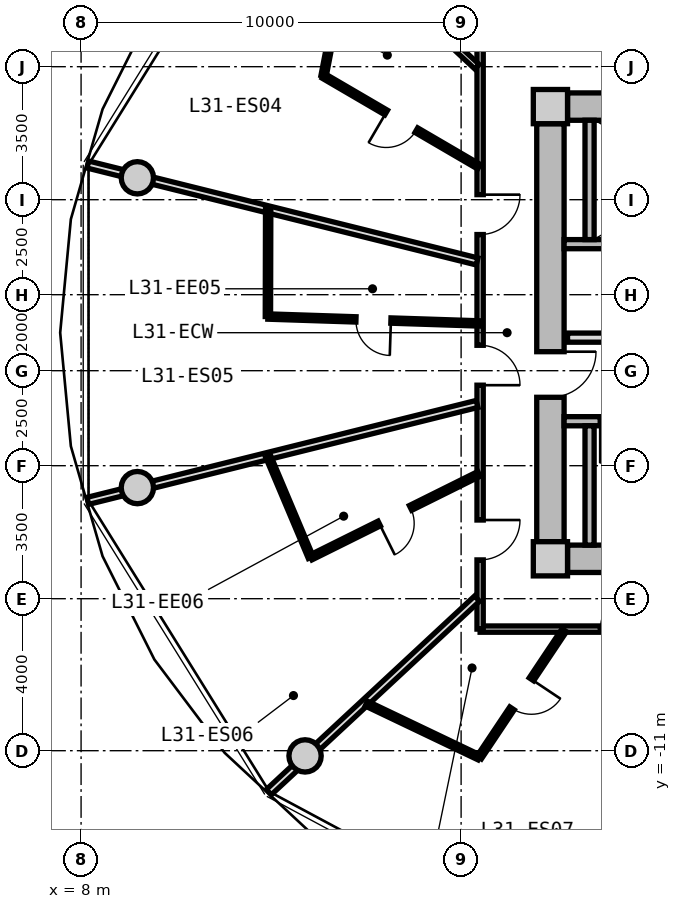
"""IFC4 building model, lengths in metres.
Left out: names, types, materials, properties, quantities, classifications, styles, units other than length and angle.
Written with IfcOpenShell. Run it as: python <this file> out.ifc"""

import sys

from ifc_helpers import new_model, si_unit, direction, frame, frame_2d, origin, origin_2d, place, context, subcontext, project, spatial, rectangle, circle, extrude, source, transform, mapped, element, fill, save


model = new_model("IFC4")
c1 = context("Model", 3, precision=1e-05, world=origin(), true_north=direction((0.0, 1.0)))
c2 = subcontext(c1, "Body", "Model", "MODEL_VIEW")
j1 = project(units=[si_unit("LENGTHUNIT", "METRE"), si_unit("PLANEANGLEUNIT", "RADIAN")], contexts=[c1])
p1 = place(None, origin())
s1 = spatial("IfcSite", under=j1, at=p1, CompositionType="ELEMENT")
p2 = place(p1, origin())
s2 = spatial("IfcBuilding", under=s1, at=p2, CompositionType="ELEMENT")
p3 = place(p2, frame((0.0, 0.0, 102.35)))
s3 = spatial("IfcBuildingStorey", under=s2, at=p3, CompositionType="ELEMENT", Elevation=102.35)
m1 = source(origin(), c2, "Body", "SweptSolid", [
    extrude(rectangle(XDim=0.9, YDim=0.9, at=origin_2d()), origin(), (0.0, 0.0, 1.0), 3.05),
])
for number, where, z_axis, x_axis in (
    (1, (20.35, -5.95, 0.0), (0.0, 0.0, 1.0), (1.0, 0.0, 0.0)),
    (2, (20.35, 5.95, 0.0), (0.0, 0.0, 1.0), (1.0, 0.0, 0.0)),
):
    element("IfcColumn", number, at=place(p3, frame(where, z_axis=z_axis, x_axis=x_axis)), inside=s3, PredefinedType="COLUMN", context=c2, shape_type="MappedRepresentation", body=[
        mapped(m1, transform((0.0, 0.0, 0.0), x_axis=(1.0, 0.0, 0.0), y_axis=(0.0, 1.0, 0.0), z_axis=(0.0, 0.0, 1.0), scale=1.0)),
    ])
m2 = source(origin(), c2, "Body", "SweptSolid", [
    extrude(rectangle(XDim=14.4, YDim=0.72, at=frame_2d((7.2, 0.0))), origin(), (0.0, 0.0, 1.0), 2.79),
])
for number, where, z_axis, x_axis in (
    (3, (20.8, 5.95, 0.0), (0.0, 0.0, 1.0), (1.0, 0.0, 0.0)),
    (4, (35.2, -5.95, 0.0), (0.0, 0.0, 1.0), (-1.0, 0.0, 0.0)),
):
    element("IfcWall", number, at=place(p3, frame(where, z_axis=z_axis, x_axis=x_axis)), inside=s3, PredefinedType="SHEAR", context=c2, shape_type="MappedRepresentation", body=[
        mapped(m2, transform((0.0, 0.0, 0.0), x_axis=(1.0, 0.0, 0.0), y_axis=(0.0, 1.0, 0.0), z_axis=(0.0, 0.0, 1.0), scale=1.0)),
    ])
m3 = source(origin(), c2, "Body", "SweptSolid", [
    extrude(rectangle(XDim=11.0, YDim=0.72, at=frame_2d((5.5, 0.0))), origin(), (0.0, 0.0, 1.0), 2.79),
])
p4 = place(p3, frame((20.35, -5.5, 0.0), z_axis=(0.0, 0.0, 1.0), x_axis=(0.0, 1.0, 0.0)))
e5 = element("IfcWall", 5, at=p4, inside=s3, PredefinedType="SHEAR", context=c2, shape_type="MappedRepresentation", body=[
    mapped(m3, transform((0.0, 0.0, 0.0), x_axis=(1.0, 0.0, 0.0), y_axis=(0.0, 1.0, 0.0), z_axis=(0.0, 0.0, 1.0), scale=1.0)),
])
p5 = place(p4, frame((3.8, 0.0, 0.0)))
e6 = element("IfcOpeningElement", 6, at=p5, cuts=e5, PredefinedType="OPENING", context=c2, shape_type="SweptSolid", body=[
    extrude(rectangle(XDim=1.2, YDim=2.15, at=frame_2d((0.6, 1.075))), frame((0.0, 0.37, 0.0), z_axis=(0.0, -1.0, 0.0), x_axis=(1.0, 0.0, 0.0)), (0.0, 0.0, 1.0), 0.74),
])
m4 = source(origin(), c2, "Body", "SweptSolid", [
    extrude(circle(Radius=0.425, at=origin_2d()), origin(), (0.0, 0.0, 1.0), 3.05),
])
for number, where, z_axis, x_axis in (
    (7, (9.481, 4.076, 0.0), (0.0, 0.0, 1.0), (1.0, 0.0, 0.0)),
    (8, (9.481, -4.076, 0.0), (0.0, 0.0, 1.0), (1.0, 0.0, 0.0)),
    (9, (13.894, -11.137, 0.0), (0.0, 0.0, 1.0), (1.0, 0.0, 0.0)),
):
    element("IfcColumn", number, at=place(p3, frame(where, z_axis=z_axis, x_axis=x_axis)), inside=s3, PredefinedType="COLUMN", context=c2, shape_type="MappedRepresentation", body=[
        mapped(m4, transform((0.0, 0.0, 0.0), x_axis=(1.0, 0.0, 0.0), y_axis=(0.0, 1.0, 0.0), z_axis=(0.0, 0.0, 1.0), scale=1.0)),
    ])
m5 = source(origin(), c2, "Body", "SweptSolid", [
    extrude(rectangle(XDim=7.83, YDim=0.24, at=frame_2d((3.915, 0.0))), origin(), (0.0, 0.0, 1.0), 2.79),
])
p6 = place(p3, frame((20.71, 2.33, 0.0), z_axis=(0.0, 0.0, 1.0), x_axis=(1.0, 0.0, 0.0)))
e10 = element("IfcWall", 10, at=p6, inside=s3, PredefinedType="PARTITIONING", context=c2, shape_type="MappedRepresentation", body=[
    mapped(m5, transform((0.0, 0.0, 0.0), x_axis=(1.0, 0.0, 0.0), y_axis=(0.0, 1.0, 0.0), z_axis=(0.0, 0.0, 1.0), scale=1.0)),
])
m6 = source(origin(), c2, "Body", "SweptSolid", [
    extrude(rectangle(XDim=3.14, YDim=0.24, at=frame_2d((1.57, 0.0))), origin(), (0.0, 0.0, 1.0), 2.79),
])
p7 = place(p3, frame((21.38, 2.45, 0.0), z_axis=(0.0, 0.0, 1.0), x_axis=(0.0, 1.0, 0.0)))
e11 = element("IfcWall", 11, at=p7, inside=s3, PredefinedType="PARTITIONING", context=c2, shape_type="MappedRepresentation", body=[
    mapped(m6, transform((0.0, 0.0, 0.0), x_axis=(1.0, 0.0, 0.0), y_axis=(0.0, 1.0, 0.0), z_axis=(0.0, 0.0, 1.0), scale=1.0)),
])
p8 = place(p3, frame((20.71, -2.33, 0.0), z_axis=(0.0, 0.0, 1.0), x_axis=(1.0, 0.0, 0.0)))
e12 = element("IfcWall", 12, at=p8, inside=s3, PredefinedType="PARTITIONING", context=c2, shape_type="MappedRepresentation", body=[
    mapped(m5, transform((0.0, 0.0, 0.0), x_axis=(1.0, 0.0, 0.0), y_axis=(0.0, 1.0, 0.0), z_axis=(0.0, 0.0, 1.0), scale=1.0)),
])
p9 = place(p8, frame((0.95, 0.0, 0.0)))
e13 = element("IfcOpeningElement", 13, at=p9, cuts=e12, PredefinedType="OPENING", context=c2, shape_type="SweptSolid", body=[
    extrude(rectangle(XDim=1.1, YDim=2.15, at=frame_2d((0.55, 1.075))), frame((0.0, 0.13, 0.0), z_axis=(0.0, -1.0, 0.0), x_axis=(1.0, 0.0, 0.0)), (0.0, 0.0, 1.0), 0.26),
])
p10 = place(p3, frame((21.38, -5.59, 0.0), z_axis=(0.0, 0.0, 1.0), x_axis=(0.0, 1.0, 0.0)))
e14 = element("IfcWall", 14, at=p10, inside=s3, PredefinedType="PARTITIONING", context=c2, shape_type="MappedRepresentation", body=[
    mapped(m6, transform((0.0, 0.0, 0.0), x_axis=(1.0, 0.0, 0.0), y_axis=(0.0, 1.0, 0.0), z_axis=(0.0, 0.0, 1.0), scale=1.0)),
])
m7 = source(origin(), c2, "Body", "SweptSolid", [
    extrude(rectangle(XDim=7.62, YDim=0.24, at=frame_2d((3.81, 0.0))), origin(), (0.0, 0.0, 1.0), 2.775),
])
p11 = place(p3, frame((20.8, -0.13, 0.0), z_axis=(0.0, 0.0, 1.0), x_axis=(1.0, 0.0, 0.0)))
e15 = element("IfcWall", 15, at=p11, inside=s3, PredefinedType="PARTITIONING", context=c2, shape_type="MappedRepresentation", body=[
    mapped(m7, transform((0.0, 0.0, 0.0), x_axis=(1.0, 0.0, 0.0), y_axis=(0.0, 1.0, 0.0), z_axis=(0.0, 0.0, 1.0), scale=1.0)),
])
p12 = place(p11, frame((6.22, 0.0, 0.0)))
e16 = element("IfcOpeningElement", 16, at=p12, cuts=e15, PredefinedType="OPENING", context=c2, shape_type="SweptSolid", body=[
    extrude(rectangle(XDim=1.0, YDim=2.1, at=frame_2d((0.5, 1.05))), frame((0.0, 0.13, 0.0), z_axis=(0.0, -1.0, 0.0), x_axis=(1.0, 0.0, 0.0)), (0.0, 0.0, 1.0), 0.26),
])
p13 = place(p11, frame((2.4, 0.0, 0.0)))
e17 = element("IfcOpeningElement", 17, at=p13, cuts=e15, PredefinedType="OPENING", context=c2, shape_type="SweptSolid", body=[
    extrude(rectangle(XDim=1.0, YDim=2.1, at=frame_2d((0.5, 1.05))), frame((0.0, 0.13, 0.0), z_axis=(0.0, -1.0, 0.0), x_axis=(1.0, 0.0, 0.0)), (0.0, 0.0, 1.0), 0.26),
])
m8 = source(origin(), c2, "Body", "SweptSolid", [
    extrude(rectangle(XDim=8.6, YDim=0.165, at=frame_2d((4.3, 0.0))), origin(), (0.0, 0.0, 1.0), 2.775),
])
p14 = place(p3, frame((27.1, -7.8, 0.0), z_axis=(0.0, 0.0, 1.0), x_axis=(-1.0, 0.0, 0.0)))
e18 = element("IfcWall", 18, at=p14, inside=s3, PredefinedType="PARTITIONING", context=c2, shape_type="MappedRepresentation", body=[
    mapped(m8, transform((0.0, 0.0, 0.0), x_axis=(1.0, 0.0, 0.0), y_axis=(0.0, 1.0, 0.0), z_axis=(0.0, 0.0, 1.0), scale=1.0)),
])
p15 = place(p14, frame((4.384, 0.0, 0.0)))
e19 = element("IfcOpeningElement", 19, at=p15, cuts=e18, PredefinedType="OPENING", context=c2, shape_type="SweptSolid", body=[
    extrude(rectangle(XDim=1.05, YDim=2.15, at=frame_2d((0.525, 1.075))), frame((0.0, 0.093, 0.0), z_axis=(0.0, -1.0, 0.0), x_axis=(1.0, 0.0, 0.0)), (0.0, 0.0, 1.0), 0.185),
])
m9 = source(origin(), c2, "Body", "SweptSolid", [
    extrude(rectangle(XDim=15.6, YDim=0.165, at=frame_2d((7.8, 0.0))), origin(), (0.0, 0.0, 1.0), 2.775),
])
p16 = place(p3, frame((18.5, -7.8, 0.0), z_axis=(0.0, 0.0, 1.0), x_axis=(0.0, 1.0, 0.0)))
e20 = element("IfcWall", 20, at=p16, inside=s3, PredefinedType="PARTITIONING", context=c2, shape_type="MappedRepresentation", body=[
    mapped(m9, transform((0.0, 0.0, 0.0), x_axis=(1.0, 0.0, 0.0), y_axis=(0.0, 1.0, 0.0), z_axis=(0.0, 0.0, 1.0), scale=1.0)),
])
p17 = place(p16, frame((10.383, 0.0, 0.0)))
e21 = element("IfcOpeningElement", 21, at=p17, cuts=e20, PredefinedType="OPENING", context=c2, shape_type="SweptSolid", body=[
    extrude(rectangle(XDim=1.05, YDim=2.15, at=frame_2d((0.525, 1.075))), frame((0.0, 0.093, 0.0), z_axis=(0.0, -1.0, 0.0), x_axis=(1.0, 0.0, 0.0)), (0.0, 0.0, 1.0), 0.185),
])
p18 = place(p16, frame((6.419, 0.0, 0.0)))
e22 = element("IfcOpeningElement", 22, at=p18, cuts=e20, PredefinedType="OPENING", context=c2, shape_type="SweptSolid", body=[
    extrude(rectangle(XDim=1.05, YDim=2.15, at=frame_2d((0.525, 1.075))), frame((0.0, 0.093, 0.0), z_axis=(0.0, -1.0, 0.0), x_axis=(1.0, 0.0, 0.0)), (0.0, 0.0, 1.0), 0.185),
])
p19 = place(p16, frame((1.821, 0.0, 0.0)))
e23 = element("IfcOpeningElement", 23, at=p19, cuts=e20, PredefinedType="OPENING", context=c2, shape_type="SweptSolid", body=[
    extrude(rectangle(XDim=1.05, YDim=2.15, at=frame_2d((0.525, 1.075))), frame((0.0, 0.093, 0.0), z_axis=(0.0, -1.0, 0.0), x_axis=(1.0, 0.0, 0.0)), (0.0, 0.0, 1.0), 0.185),
])
m10 = source(origin(), c2, "Body", "SweptSolid", [
    extrude(rectangle(XDim=7.482, YDim=0.165, at=frame_2d((3.741, 0.0))), origin(), (0.0, 0.0, 1.0), 2.275),
])
p20 = place(p3, frame((18.42, 6.998, 0.0), z_axis=(0.0, 0.0, 1.0), x_axis=(-0.732508698043, 0.680757671489, 0.0)))
e24 = element("IfcWall", 24, at=p20, inside=s3, PredefinedType="PARTITIONING", context=c2, shape_type="MappedRepresentation", body=[
    mapped(m10, transform((0.0, 0.0, 0.0), x_axis=(1.0, 0.0, 0.0), y_axis=(0.0, 1.0, 0.0), z_axis=(0.0, 0.0, 1.0), scale=1.0)),
])
m11 = source(origin(), c2, "Body", "SweptSolid", [
    extrude(rectangle(XDim=8.989, YDim=0.165, at=frame_2d((4.495, 0.0))), origin(), (0.0, 0.0, 1.0), 2.275),
])
p21 = place(p3, frame((23.678, -7.88, 0.0), z_axis=(0.0, 0.0, 1.0), x_axis=(-0.27702323008, -0.960863221274, 0.0)))
e25 = element("IfcWall", 25, at=p21, inside=s3, PredefinedType="PARTITIONING", context=c2, shape_type="MappedRepresentation", body=[
    mapped(m11, transform((0.0, 0.0, 0.0), x_axis=(1.0, 0.0, 0.0), y_axis=(0.0, 1.0, 0.0), z_axis=(0.0, 0.0, 1.0), scale=1.0)),
])
m12 = source(origin(), c2, "Body", "SweptSolid", [
    extrude(rectangle(XDim=10.556, YDim=0.19, at=frame_2d((5.278, 0.0))), origin(), (0.0, 0.0, 1.0), 2.275),
])
p22 = place(p3, frame((18.42, 1.875, 0.0), z_axis=(0.0, 0.0, 1.0), x_axis=(-0.970363857851, 0.241648470667, 0.0)))
e26 = element("IfcWall", 26, at=p22, inside=s3, PredefinedType="PARTITIONING", context=c2, shape_type="MappedRepresentation", body=[
    mapped(m12, transform((0.0, 0.0, 0.0), x_axis=(1.0, 0.0, 0.0), y_axis=(0.0, 1.0, 0.0), z_axis=(0.0, 0.0, 1.0), scale=1.0)),
])
m13 = source(origin(), c2, "Body", "SweptSolid", [
    extrude(rectangle(XDim=4.735, YDim=0.14, at=frame_2d((2.368, 0.0))), origin(), (0.0, 0.0, 1.0), 2.775),
])
p23 = place(p3, frame((18.47, 4.368, 0.0), z_axis=(0.0, 0.0, 1.0), x_axis=(-0.863537576642, 0.504284496814, 0.0)))
e27 = element("IfcWall", 27, at=p23, inside=s3, PredefinedType="PARTITIONING", context=c2, shape_type="MappedRepresentation", body=[
    mapped(m13, transform((0.0, 0.0, 0.0), x_axis=(1.0, 0.0, 0.0), y_axis=(0.0, 1.0, 0.0), z_axis=(0.0, 0.0, 1.0), scale=1.0)),
])
p24 = place(p23, frame((1.908, 0.0, 0.0)))
e28 = element("IfcOpeningElement", 28, at=p24, cuts=e27, PredefinedType="OPENING", context=c2, shape_type="SweptSolid", body=[
    extrude(rectangle(XDim=0.92, YDim=2.1, at=frame_2d((0.46, 1.05))), frame((0.0, 0.08, 0.0), z_axis=(0.0, -1.0, 0.0), x_axis=(1.0, 0.0, 0.0)), (0.0, 0.0, 1.0), 0.16),
])
m14 = source(origin(), c2, "Body", "SweptSolid", [
    extrude(rectangle(XDim=3.499, YDim=0.14, at=frame_2d((1.75, 0.0))), origin(), (0.0, 0.0, 1.0), 2.775),
])
p25 = place(p3, frame((14.381, 6.756, 0.0), z_axis=(0.0, 0.0, 1.0), x_axis=(0.18957713629, 0.981865830649, 0.0)))
e29 = element("IfcWall", 29, at=p25, inside=s3, PredefinedType="PARTITIONING", context=c2, shape_type="MappedRepresentation", body=[
    mapped(m14, transform((0.0, 0.0, 0.0), x_axis=(1.0, 0.0, 0.0), y_axis=(0.0, 1.0, 0.0), z_axis=(0.0, 0.0, 1.0), scale=1.0)),
])
p26 = place(p3, frame((18.42, -1.875, 0.0), z_axis=(0.0, 0.0, 1.0), x_axis=(-0.970363857851, -0.241648470667, 0.0)))
e30 = element("IfcWall", 30, at=p26, inside=s3, PredefinedType="PARTITIONING", context=c2, shape_type="MappedRepresentation", body=[
    mapped(m12, transform((0.0, 0.0, 0.0), x_axis=(1.0, 0.0, 0.0), y_axis=(0.0, 1.0, 0.0), z_axis=(0.0, 0.0, 1.0), scale=1.0)),
])
m15 = source(origin(), c2, "Body", "SweptSolid", [
    extrude(rectangle(XDim=5.557, YDim=0.14, at=frame_2d((2.778, 0.0))), origin(), (0.0, 0.0, 1.0), 2.775),
])
p27 = place(p3, frame((18.47, 0.244, 0.0), z_axis=(0.0, 0.0, 1.0), x_axis=(-0.999468495627, 0.03259948234, 0.0)))
e31 = element("IfcWall", 31, at=p27, inside=s3, PredefinedType="PARTITIONING", context=c2, shape_type="MappedRepresentation", body=[
    mapped(m15, transform((0.0, 0.0, 0.0), x_axis=(1.0, 0.0, 0.0), y_axis=(0.0, 1.0, 0.0), z_axis=(0.0, 0.0, 1.0), scale=1.0)),
])
p28 = place(p27, frame((2.318, 0.0, 0.0)))
e32 = element("IfcOpeningElement", 32, at=p28, cuts=e31, PredefinedType="OPENING", context=c2, shape_type="SweptSolid", body=[
    extrude(rectangle(XDim=0.92, YDim=2.1, at=frame_2d((0.46, 1.05))), frame((0.0, 0.08, 0.0), z_axis=(0.0, -1.0, 0.0), x_axis=(1.0, 0.0, 0.0)), (0.0, 0.0, 1.0), 0.16),
])
m16 = source(origin(), c2, "Body", "SweptSolid", [
    extrude(rectangle(XDim=2.837, YDim=0.14, at=frame_2d((1.418, 0.0))), origin(), (0.0, 0.0, 1.0), 2.775),
])
p29 = place(p3, frame((12.916, 0.425, 0.0), z_axis=(0.0, 0.0, 1.0), x_axis=(0.002409838945, 0.999997096334, 0.0)))
e33 = element("IfcWall", 33, at=p29, inside=s3, PredefinedType="PARTITIONING", context=c2, shape_type="MappedRepresentation", body=[
    mapped(m16, transform((0.0, 0.0, 0.0), x_axis=(1.0, 0.0, 0.0), y_axis=(0.0, 1.0, 0.0), z_axis=(0.0, 0.0, 1.0), scale=1.0)),
])
m17 = source(origin(), c2, "Body", "SweptSolid", [
    extrude(rectangle(XDim=7.482, YDim=0.19, at=frame_2d((3.741, 0.0))), origin(), (0.0, 0.0, 1.0), 2.275),
])
p30 = place(p3, frame((18.42, -6.998, 0.0), z_axis=(0.0, 0.0, 1.0), x_axis=(-0.732508698043, -0.680757671489, 0.0)))
e34 = element("IfcWall", 34, at=p30, inside=s3, PredefinedType="PARTITIONING", context=c2, shape_type="MappedRepresentation", body=[
    mapped(m17, transform((0.0, 0.0, 0.0), x_axis=(1.0, 0.0, 0.0), y_axis=(0.0, 1.0, 0.0), z_axis=(0.0, 0.0, 1.0), scale=1.0)),
])
m18 = source(origin(), c2, "Body", "SweptSolid", [
    extrude(rectangle(XDim=4.941, YDim=0.14, at=frame_2d((2.471, 0.0))), origin(), (0.0, 0.0, 1.0), 2.775),
])
p31 = place(p3, frame((18.47, -3.717, 0.0), z_axis=(0.0, 0.0, 1.0), x_axis=(-0.89555083256, -0.444959218694, 0.0)))
e35 = element("IfcWall", 35, at=p31, inside=s3, PredefinedType="PARTITIONING", context=c2, shape_type="MappedRepresentation", body=[
    mapped(m18, transform((0.0, 0.0, 0.0), x_axis=(1.0, 0.0, 0.0), y_axis=(0.0, 1.0, 0.0), z_axis=(0.0, 0.0, 1.0), scale=1.0)),
])
p32 = place(p31, frame((2.011, 0.0, 0.0)))
e36 = element("IfcOpeningElement", 36, at=p32, cuts=e35, PredefinedType="OPENING", context=c2, shape_type="SweptSolid", body=[
    extrude(rectangle(XDim=0.92, YDim=2.1, at=frame_2d((0.46, 1.05))), frame((0.0, 0.08, 0.0), z_axis=(0.0, -1.0, 0.0), x_axis=(1.0, 0.0, 0.0)), (0.0, 0.0, 1.0), 0.16),
])
m19 = source(origin(), c2, "Body", "SweptSolid", [
    extrude(rectangle(XDim=2.88, YDim=0.14, at=frame_2d((1.44, 0.0))), origin(), (0.0, 0.0, 1.0), 2.415),
])
p33 = place(p3, frame((14.045, -5.915, 0.0), z_axis=(0.0, 0.0, 1.0), x_axis=(-0.38878819597, 0.921327161585, 0.0)))
e37 = element("IfcWall", 37, at=p33, inside=s3, PredefinedType="PARTITIONING", context=c2, shape_type="MappedRepresentation", body=[
    mapped(m19, transform((0.0, 0.0, 0.0), x_axis=(1.0, 0.0, 0.0), y_axis=(0.0, 1.0, 0.0), z_axis=(0.0, 0.0, 1.0), scale=1.0)),
])
m20 = source(origin(), c2, "Body", "SweptSolid", [
    extrude(rectangle(XDim=4.027, YDim=0.14, at=frame_2d((2.014, 0.0))), origin(), (0.0, 0.0, 1.0), 2.775),
])
p34 = place(p3, frame((20.714, -7.83, 0.0), z_axis=(0.0, 0.0, 1.0), x_axis=(-0.555832825922, -0.831294093343, 0.0)))
e38 = element("IfcWall", 38, at=p34, inside=s3, PredefinedType="PARTITIONING", context=c2, shape_type="MappedRepresentation", body=[
    mapped(m20, transform((0.0, 0.0, 0.0), x_axis=(1.0, 0.0, 0.0), y_axis=(0.0, 1.0, 0.0), z_axis=(0.0, 0.0, 1.0), scale=1.0)),
])
p35 = place(p34, frame((1.554, 0.0, 0.0)))
e39 = element("IfcOpeningElement", 39, at=p35, cuts=e38, PredefinedType="OPENING", context=c2, shape_type="SweptSolid", body=[
    extrude(rectangle(XDim=0.92, YDim=2.1, at=frame_2d((0.46, 1.05))), frame((0.0, 0.08, 0.0), z_axis=(0.0, -1.0, 0.0), x_axis=(1.0, 0.0, 0.0)), (0.0, 0.0, 1.0), 0.16),
])
m21 = source(origin(), c2, "Body", "SweptSolid", [
    extrude(rectangle(XDim=3.291, YDim=0.14, at=frame_2d((1.646, 0.0))), origin(), (0.0, 0.0, 1.0), 2.775),
])
p36 = place(p3, frame((18.476, -11.178, 0.0), z_axis=(0.0, 0.0, 1.0), x_axis=(-0.902381393443, 0.430938302739, 0.0)))
e40 = element("IfcWall", 40, at=p36, inside=s3, PredefinedType="PARTITIONING", context=c2, shape_type="MappedRepresentation", body=[
    mapped(m21, transform((0.0, 0.0, 0.0), x_axis=(1.0, 0.0, 0.0), y_axis=(0.0, 1.0, 0.0), z_axis=(0.0, 0.0, 1.0), scale=1.0)),
])
m22 = source(origin(), c2, "Body", "SweptSolid", [
    extrude(rectangle(XDim=1.1, YDim=2.15, at=frame_2d((0.55, 1.075))), frame((0.0, 0.025, 0.0), z_axis=(0.0, -1.0, 0.0), x_axis=(1.0, 0.0, 0.0)), (0.0, 0.0, 1.0), 0.05),
])
p37 = place(p9, frame((1.1, 0.0, 0.0), z_axis=(0.0, 0.0, 1.0), x_axis=(-1.0, 0.0, 0.0)))
e41 = element("IfcDoor", 41, at=p37, inside=s3, OperationType="SINGLE_SWING_RIGHT", PredefinedType="DOOR", context=c2, shape_type="MappedRepresentation", body=[
    mapped(m22, transform((0.0, 0.0, 0.0), x_axis=(1.0, 0.0, 0.0), y_axis=(0.0, 1.0, 0.0), z_axis=(0.0, 0.0, 1.0), scale=1.0)),
])
fill(e13, e41)
m23 = source(origin(), c2, "Body", "SweptSolid", [
    extrude(rectangle(XDim=1.2, YDim=2.15, at=frame_2d((0.6, 1.075))), frame((0.0, 0.025, 0.0), z_axis=(0.0, -1.0, 0.0), x_axis=(1.0, 0.0, 0.0)), (0.0, 0.0, 1.0), 0.05),
])
p38 = place(p5, frame((1.2, 0.0, 0.0), z_axis=(0.0, 0.0, 1.0), x_axis=(-1.0, 0.0, 0.0)))
e42 = element("IfcDoor", 42, at=p38, inside=s3, OperationType="SINGLE_SWING_LEFT", PredefinedType="DOOR", context=c2, shape_type="MappedRepresentation", body=[
    mapped(m23, transform((0.0, 0.0, 0.0), x_axis=(1.0, 0.0, 0.0), y_axis=(0.0, 1.0, 0.0), z_axis=(0.0, 0.0, 1.0), scale=1.0)),
])
fill(e6, e42)
m24 = source(origin(), c2, "Body", "SweptSolid", [
    extrude(rectangle(XDim=1.05, YDim=2.15, at=frame_2d((0.525, 1.075))), frame((0.0, 0.025, 0.0), z_axis=(0.0, -1.0, 0.0), x_axis=(1.0, 0.0, 0.0)), (0.0, 0.0, 1.0), 0.05),
])
p39 = place(p17, frame((1.05, 0.0, 0.0), z_axis=(0.0, 0.0, 1.0), x_axis=(-1.0, 0.0, 0.0)))
e43 = element("IfcDoor", 43, at=p39, inside=s3, OperationType="SINGLE_SWING_LEFT", PredefinedType="DOOR", context=c2, shape_type="MappedRepresentation", body=[
    mapped(m24, transform((0.0, 0.0, 0.0), x_axis=(1.0, 0.0, 0.0), y_axis=(0.0, 1.0, 0.0), z_axis=(0.0, 0.0, 1.0), scale=1.0)),
])
fill(e21, e43)
m25 = source(origin(), c2, "Body", "SweptSolid", [
    extrude(rectangle(XDim=0.92, YDim=2.1, at=frame_2d((0.46, 1.05))), frame((0.0, 0.025, 0.0), z_axis=(0.0, -1.0, 0.0), x_axis=(1.0, 0.0, 0.0)), (0.0, 0.0, 1.0), 0.05),
])
p40 = place(p24, origin())
e44 = element("IfcDoor", 44, at=p40, inside=s3, OperationType="SINGLE_SWING_RIGHT", PredefinedType="DOOR", context=c2, shape_type="MappedRepresentation", body=[
    mapped(m25, transform((0.0, 0.0, 0.0), x_axis=(1.0, 0.0, 0.0), y_axis=(0.0, 1.0, 0.0), z_axis=(0.0, 0.0, 1.0), scale=1.0)),
])
fill(e28, e44)
p41 = place(p18, frame((1.05, 0.0, 0.0), z_axis=(0.0, 0.0, 1.0), x_axis=(-1.0, 0.0, 0.0)))
e45 = element("IfcDoor", 45, at=p41, inside=s3, OperationType="SINGLE_SWING_RIGHT", PredefinedType="DOOR", context=c2, shape_type="MappedRepresentation", body=[
    mapped(m24, transform((0.0, 0.0, 0.0), x_axis=(1.0, 0.0, 0.0), y_axis=(0.0, 1.0, 0.0), z_axis=(0.0, 0.0, 1.0), scale=1.0)),
])
fill(e22, e45)
p42 = place(p28, origin())
e46 = element("IfcDoor", 46, at=p42, inside=s3, OperationType="SINGLE_SWING_LEFT", PredefinedType="DOOR", context=c2, shape_type="MappedRepresentation", body=[
    mapped(m25, transform((0.0, 0.0, 0.0), x_axis=(1.0, 0.0, 0.0), y_axis=(0.0, 1.0, 0.0), z_axis=(0.0, 0.0, 1.0), scale=1.0)),
])
fill(e32, e46)
p43 = place(p19, frame((1.05, 0.0, 0.0), z_axis=(0.0, 0.0, 1.0), x_axis=(-1.0, 0.0, 0.0)))
e47 = element("IfcDoor", 47, at=p43, inside=s3, OperationType="SINGLE_SWING_LEFT", PredefinedType="DOOR", context=c2, shape_type="MappedRepresentation", body=[
    mapped(m24, transform((0.0, 0.0, 0.0), x_axis=(1.0, 0.0, 0.0), y_axis=(0.0, 1.0, 0.0), z_axis=(0.0, 0.0, 1.0), scale=1.0)),
])
fill(e23, e47)
p44 = place(p32, origin())
e48 = element("IfcDoor", 48, at=p44, inside=s3, OperationType="SINGLE_SWING_RIGHT", PredefinedType="DOOR", context=c2, shape_type="MappedRepresentation", body=[
    mapped(m25, transform((0.0, 0.0, 0.0), x_axis=(1.0, 0.0, 0.0), y_axis=(0.0, 1.0, 0.0), z_axis=(0.0, 0.0, 1.0), scale=1.0)),
])
fill(e36, e48)
p45 = place(p15, frame((1.05, 0.0, 0.0), z_axis=(0.0, 0.0, 1.0), x_axis=(-1.0, 0.0, 0.0)))
e49 = element("IfcDoor", 49, at=p45, inside=s3, OperationType="SINGLE_SWING_RIGHT", PredefinedType="DOOR", context=c2, shape_type="MappedRepresentation", body=[
    mapped(m24, transform((0.0, 0.0, 0.0), x_axis=(1.0, 0.0, 0.0), y_axis=(0.0, 1.0, 0.0), z_axis=(0.0, 0.0, 1.0), scale=1.0)),
])
fill(e19, e49)
p46 = place(p35, origin())
e50 = element("IfcDoor", 50, at=p46, inside=s3, OperationType="SINGLE_SWING_LEFT", PredefinedType="DOOR", context=c2, shape_type="MappedRepresentation", body=[
    mapped(m25, transform((0.0, 0.0, 0.0), x_axis=(1.0, 0.0, 0.0), y_axis=(0.0, 1.0, 0.0), z_axis=(0.0, 0.0, 1.0), scale=1.0)),
])
fill(e39, e50)
save(model, sys.argv[1])
